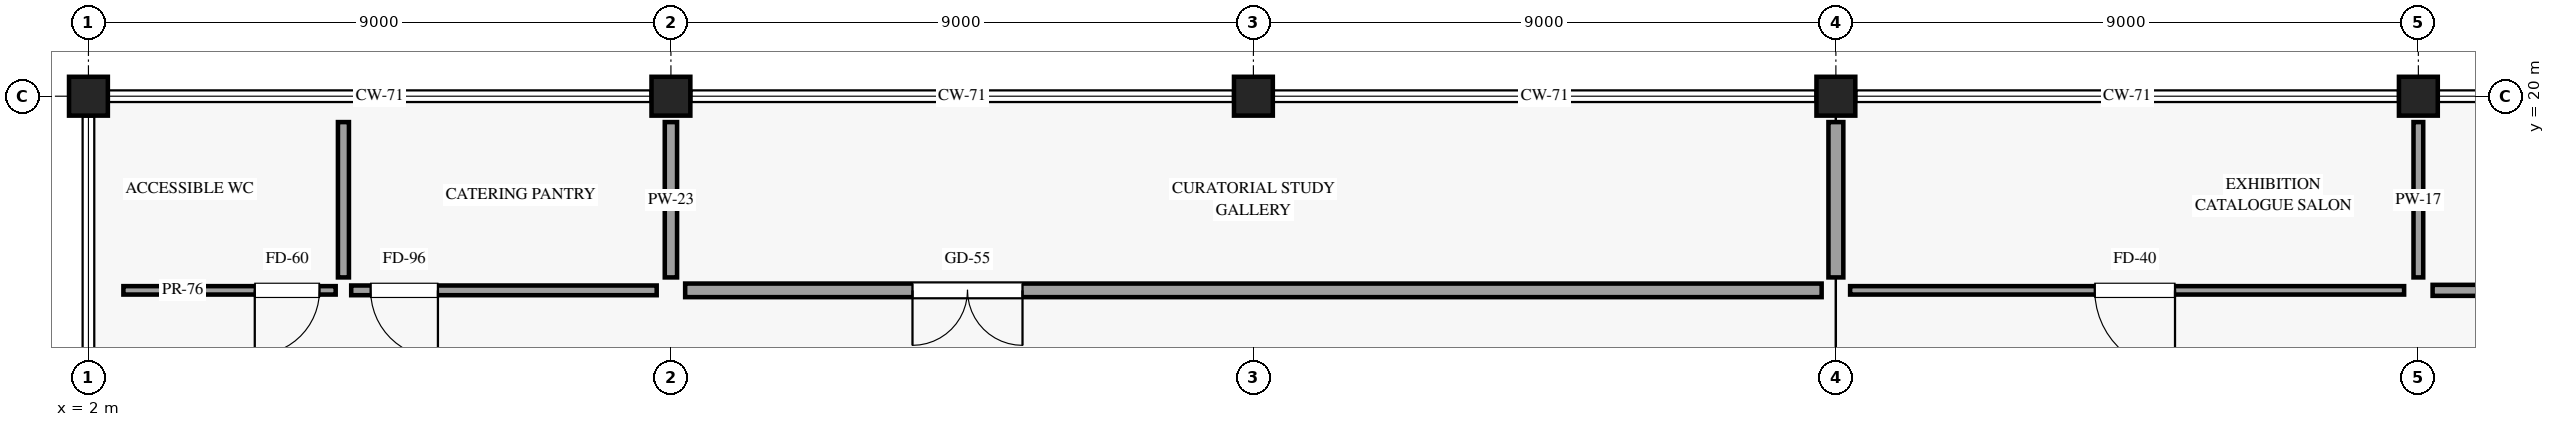
"""IFC4 building model, lengths in metres.
Left out: names, types, materials, properties, quantities, classifications, styles, units other than length and angle.
Written with IfcOpenShell. Run it as: python <this file> out.ifc"""

import sys

from ifc_helpers import new_model, si_unit, direction, frame, frame_2d, origin, origin_2d, place, context, subcontext, project, spatial, rectangle, extrude, element, fill, save


model = new_model("IFC4")
c1 = context("Model", 3, precision=1e-05, world=origin(), true_north=direction((0.0, 1.0)))
c2 = subcontext(c1, "Body", "Model", "MODEL_VIEW")
j1 = project(units=[si_unit("LENGTHUNIT", "METRE"), si_unit("PLANEANGLEUNIT", "RADIAN")], contexts=[c1])
p1 = place(None, origin())
s1 = spatial("IfcSite", under=j1, at=p1, CompositionType="ELEMENT")
p2 = place(p1, origin())
s2 = spatial("IfcBuilding", under=s1, at=p2, CompositionType="ELEMENT")
p3 = place(p2, frame((0.0, 0.0, 19.5)))
s3 = spatial("IfcBuildingStorey", under=s2, at=p3, CompositionType="ELEMENT", Elevation=19.5)
for number, where, z_axis, x_axis in (
    (1, (2.0, 20.0, 0.0), (0.0, 0.0, 1.0), (1.0, 0.0, 0.0)),
    (2, (11.0, 20.0, 0.0), (0.0, 0.0, 1.0), (1.0, 0.0, 0.0)),
    (3, (20.0, 20.0, 0.0), (0.0, 0.0, 1.0), (1.0, 0.0, 0.0)),
    (4, (29.0, 20.0, 0.0), (0.0, 0.0, 1.0), (1.0, 0.0, 0.0)),
    (5, (38.0, 20.0, 0.0), (0.0, 0.0, 1.0), (1.0, 0.0, 0.0)),
):
    element("IfcColumn", number, at=place(p3, frame(where, z_axis=z_axis, x_axis=x_axis)), inside=s3, PredefinedType="COLUMN", context=c2, shape_type="SweptSolid", body=[
        extrude(rectangle(XDim=0.6, YDim=0.6, at=origin_2d()), origin(), (0.0, 0.0, 1.0), 4.5),
    ])
p4 = place(p3, frame((2.54, 17.0, 0.0), z_axis=(0.0, 0.0, 1.0), x_axis=(1.0, 0.0, 0.0)))
e6 = element("IfcWall", 6, at=p4, inside=s3, PredefinedType="PARTITIONING", context=c2, shape_type="SweptSolid", body=[
    extrude(rectangle(XDim=3.28, YDim=0.13, at=frame_2d((1.64, 0.0))), origin(), (0.0, 0.0, 1.0), 3.835),
])
p5 = place(p4, frame((3.03, 0.0, 0.0), z_axis=(0.0, 0.0, 1.0), x_axis=(-1.0, 0.0, 0.0)))
e7 = element("IfcOpeningElement", 7, at=p5, cuts=e6, PredefinedType="OPENING", context=c2, shape_type="SweptSolid", body=[
    extrude(rectangle(XDim=1.0, YDim=2.2, at=frame_2d((0.5, 1.1))), frame((0.0, 0.075, 0.0), z_axis=(0.0, -1.0, 0.0), x_axis=(1.0, 0.0, 0.0)), (0.0, 0.0, 1.0), 0.15),
])
p6 = place(p3, frame((6.06, 17.0, 0.0), z_axis=(0.0, 0.0, 1.0), x_axis=(1.0, 0.0, 0.0)))
e8 = element("IfcWall", 8, at=p6, inside=s3, PredefinedType="PARTITIONING", context=c2, shape_type="SweptSolid", body=[
    extrude(rectangle(XDim=4.72, YDim=0.15, at=frame_2d((2.36, 0.0))), origin(), (0.0, 0.0, 1.0), 3.715),
])
p7 = place(p6, frame((1.34, 0.0, 0.0), z_axis=(0.0, 0.0, 1.0), x_axis=(-1.0, 0.0, 0.0)))
e9 = element("IfcOpeningElement", 9, at=p7, cuts=e8, PredefinedType="OPENING", context=c2, shape_type="SweptSolid", body=[
    extrude(rectangle(XDim=1.04, YDim=2.22, at=frame_2d((0.52, 1.11))), frame((0.0, 0.085, 0.0), z_axis=(0.0, -1.0, 0.0), x_axis=(1.0, 0.0, 0.0)), (0.0, 0.0, 1.0), 0.17),
])
p8 = place(p3, frame((5.94, 17.2, 0.0), z_axis=(0.0, 0.0, 1.0), x_axis=(0.0, 1.0, 0.0)))
e10 = element("IfcWall", 10, at=p8, inside=s3, PredefinedType="PARTITIONING", context=c2, shape_type="SweptSolid", body=[
    extrude(rectangle(XDim=2.4, YDim=0.17, at=frame_2d((1.2, 0.0))), origin(), (0.0, 0.0, 1.0), 4.18),
])
p9 = place(p3, frame((11.0, 17.2, 0.0), z_axis=(0.0, 0.0, 1.0), x_axis=(0.0, 1.0, 0.0)))
e11 = element("IfcWall", 11, at=p9, inside=s3, PredefinedType="PARTITIONING", context=c2, shape_type="SweptSolid", body=[
    extrude(rectangle(XDim=2.4, YDim=0.19, at=frame_2d((1.2, 0.0))), origin(), (0.0, 0.0, 1.0), 3.715),
])
p10 = place(p3, frame((11.22, 17.0, 0.0), z_axis=(0.0, 0.0, 1.0), x_axis=(1.0, 0.0, 0.0)))
e12 = element("IfcWall", 12, at=p10, inside=s3, PredefinedType="PARTITIONING", context=c2, shape_type="SweptSolid", body=[
    extrude(rectangle(XDim=17.56, YDim=0.21, at=frame_2d((8.78, 0.0))), origin(), (0.0, 0.0, 1.0), 3.715),
])
p11 = place(p10, frame((5.212, 0.0, 0.0), z_axis=(0.0, 0.0, 1.0), x_axis=(-1.0, 0.0, 0.0)))
e13 = element("IfcOpeningElement", 13, at=p11, cuts=e12, PredefinedType="OPENING", context=c2, shape_type="SweptSolid", body=[
    extrude(rectangle(XDim=1.7, YDim=2.44, at=frame_2d((0.85, 1.22))), frame((0.0, 0.115, 0.0), z_axis=(0.0, -1.0, 0.0), x_axis=(1.0, 0.0, 0.0)), (0.0, 0.0, 1.0), 0.23),
])
p12 = place(p3, frame((29.0, 17.2, 0.0), z_axis=(0.0, 0.0, 1.0), x_axis=(0.0, 1.0, 0.0)))
e14 = element("IfcWall", 14, at=p12, inside=s3, PredefinedType="PARTITIONING", context=c2, shape_type="SweptSolid", body=[
    extrude(rectangle(XDim=2.4, YDim=0.23, at=frame_2d((1.2, 0.0))), origin(), (0.0, 0.0, 1.0), 3.715),
])
p13 = place(p3, frame((29.22, 17.0, 0.0), z_axis=(0.0, 0.0, 1.0), x_axis=(1.0, 0.0, 0.0)))
e15 = element("IfcWall", 15, at=p13, inside=s3, PredefinedType="PARTITIONING", context=c2, shape_type="SweptSolid", body=[
    extrude(rectangle(XDim=8.56, YDim=0.13, at=frame_2d((4.28, 0.0))), origin(), (0.0, 0.0, 1.0), 3.715),
])
p14 = place(p13, frame((5.02, 0.0, 0.0), z_axis=(0.0, 0.0, 1.0), x_axis=(-1.0, 0.0, 0.0)))
e16 = element("IfcOpeningElement", 16, at=p14, cuts=e15, PredefinedType="OPENING", context=c2, shape_type="SweptSolid", body=[
    extrude(rectangle(XDim=1.24, YDim=2.32, at=frame_2d((0.62, 1.16))), frame((0.0, 0.075, 0.0), z_axis=(0.0, -1.0, 0.0), x_axis=(1.0, 0.0, 0.0)), (0.0, 0.0, 1.0), 0.15),
])
p15 = place(p3, frame((38.0, 17.2, 0.0), z_axis=(0.0, 0.0, 1.0), x_axis=(0.0, 1.0, 0.0)))
e17 = element("IfcWall", 17, at=p15, inside=s3, PredefinedType="PARTITIONING", context=c2, shape_type="SweptSolid", body=[
    extrude(rectangle(XDim=2.4, YDim=0.15, at=frame_2d((1.2, 0.0))), origin(), (0.0, 0.0, 1.0), 3.715),
])
p16 = place(p3, frame((38.22, 17.0, 0.0), z_axis=(0.0, 0.0, 1.0), x_axis=(1.0, 0.0, 0.0)))
e18 = element("IfcWall", 18, at=p16, inside=s3, PredefinedType="PARTITIONING", context=c2, shape_type="SweptSolid", body=[
    extrude(rectangle(XDim=17.56, YDim=0.17, at=frame_2d((8.78, 0.0))), origin(), (0.0, 0.0, 1.0), 3.715),
])
p17 = place(p16, frame((13.776, 0.0, 0.0), z_axis=(0.0, 0.0, 1.0), x_axis=(-1.0, 0.0, 0.0)))
e19 = element("IfcOpeningElement", 19, at=p17, cuts=e18, PredefinedType="OPENING", context=c2, shape_type="SweptSolid", body=[
    extrude(rectangle(XDim=0.95, YDim=2.15, at=frame_2d((0.475, 1.075))), frame((0.0, 0.095, 0.0), z_axis=(0.0, -1.0, 0.0), x_axis=(1.0, 0.0, 0.0)), (0.0, 0.0, 1.0), 0.19),
])
p18 = place(p5, origin())
e20 = element("IfcDoor", 20, at=p18, inside=s3, OperationType="SINGLE_SWING_RIGHT", PredefinedType="DOOR", context=c2, shape_type="SweptSolid", body=[
    extrude(rectangle(XDim=1.0, YDim=2.2, at=frame_2d((0.5, 1.1))), frame((0.0, 0.025, 0.0), z_axis=(0.0, -1.0, 0.0), x_axis=(1.0, 0.0, 0.0)), (0.0, 0.0, 1.0), 0.05),
])
fill(e7, e20)
p19 = place(p7, origin())
e21 = element("IfcDoor", 21, at=p19, inside=s3, OperationType="SINGLE_SWING_LEFT", PredefinedType="DOOR", context=c2, shape_type="SweptSolid", body=[
    extrude(rectangle(XDim=1.04, YDim=2.22, at=frame_2d((0.52, 1.11))), frame((0.0, 0.025, 0.0), z_axis=(0.0, -1.0, 0.0), x_axis=(1.0, 0.0, 0.0)), (0.0, 0.0, 1.0), 0.05),
])
fill(e9, e21)
p20 = place(p11, origin())
e22 = element("IfcDoor", 22, at=p20, inside=s3, OperationType="DOUBLE_DOOR_SINGLE_SWING", PredefinedType="DOOR", context=c2, shape_type="SweptSolid", body=[
    extrude(rectangle(XDim=1.7, YDim=2.44, at=frame_2d((0.85, 1.22))), frame((0.0, 0.025, 0.0), z_axis=(0.0, -1.0, 0.0), x_axis=(1.0, 0.0, 0.0)), (0.0, 0.0, 1.0), 0.05),
])
fill(e13, e22)
p21 = place(p14, origin())
e23 = element("IfcDoor", 23, at=p21, inside=s3, OperationType="SINGLE_SWING_LEFT", PredefinedType="DOOR", context=c2, shape_type="SweptSolid", body=[
    extrude(rectangle(XDim=1.24, YDim=2.32, at=frame_2d((0.62, 1.16))), frame((0.0, 0.025, 0.0), z_axis=(0.0, -1.0, 0.0), x_axis=(1.0, 0.0, 0.0)), (0.0, 0.0, 1.0), 0.05),
])
fill(e16, e23)
save(model, sys.argv[1])
